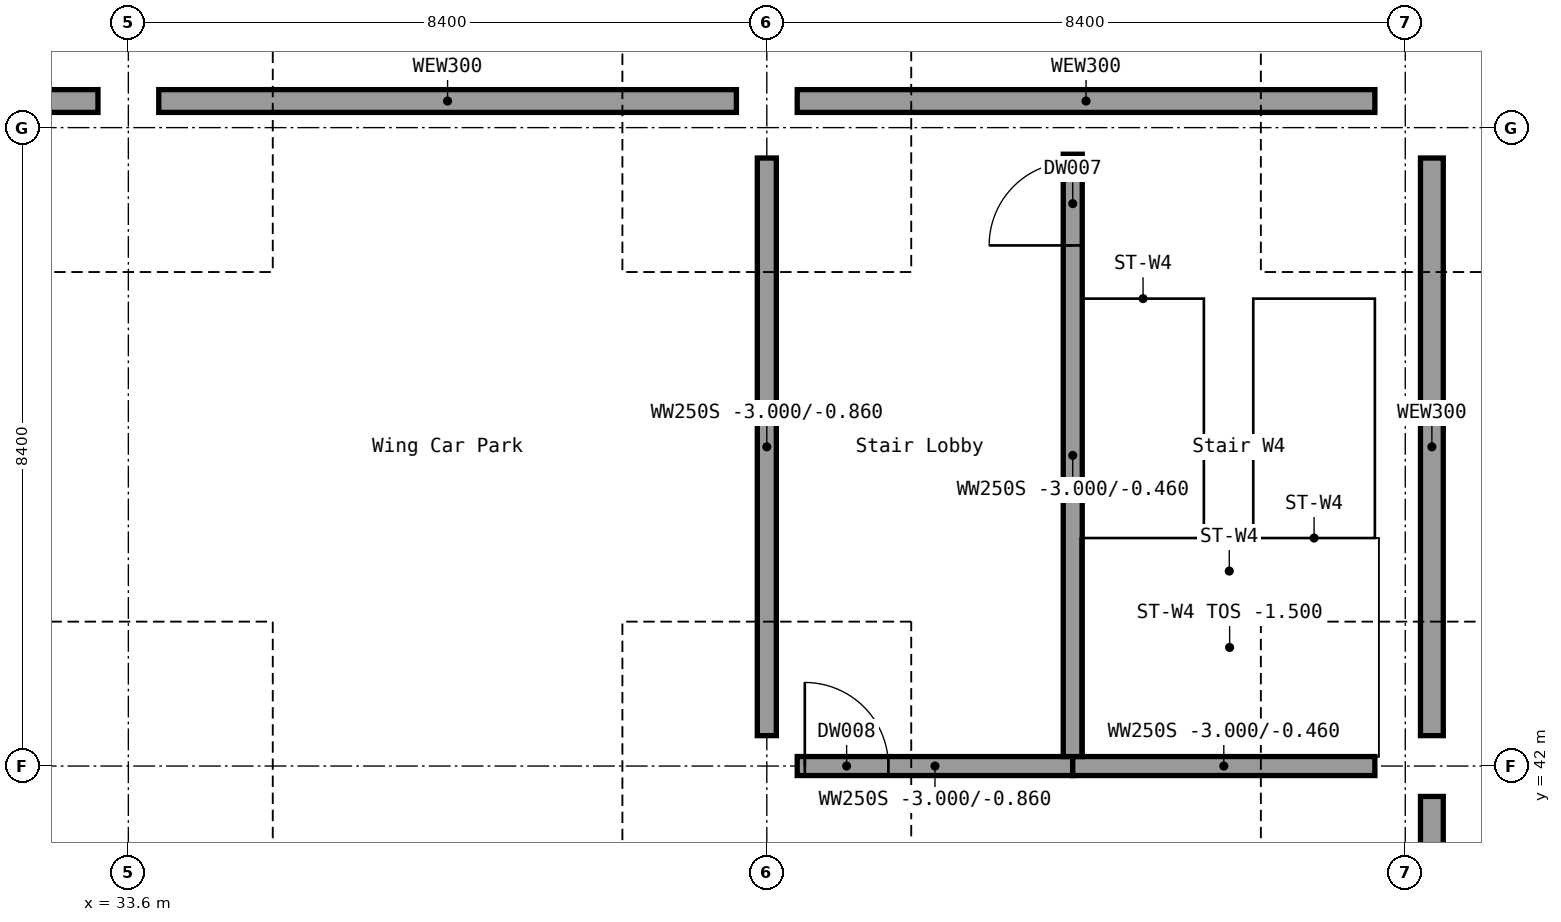
"""IFC4 building model, lengths in metres.
Left out: names, types, materials, properties, quantities, classifications, styles, units other than length and angle.
Written with IfcOpenShell. Run it as: python <this file> out.ifc"""

import sys

from ifc_helpers import new_model, si_unit, direction, frame, frame_2d, origin, origin_2d, place, context, subcontext, project, spatial, rectangle, extrude, element, fill, save


model = new_model("IFC4")
c1 = context("Model", 3, precision=1e-05, world=origin(), true_north=direction((0.0, 1.0)))
c2 = subcontext(c1, "Body", "Model", "MODEL_VIEW")
j1 = project(units=[si_unit("LENGTHUNIT", "METRE"), si_unit("PLANEANGLEUNIT", "RADIAN")], contexts=[c1])
p1 = place(None, origin())
s1 = spatial("IfcSite", under=j1, at=p1, CompositionType="ELEMENT")
p2 = place(p1, origin())
s2 = spatial("IfcBuilding", under=s1, at=p2, CompositionType="ELEMENT")
p3 = place(p2, frame((0.0, 0.0, -3.0)))
s3 = spatial("IfcBuildingStorey", under=s2, at=p3, CompositionType="ELEMENT", Elevation=-3.0)
for number, where, z_axis, x_axis in (
    (1, (33.6, 42.0, 0.0), (0.0, 0.0, 1.0), (1.0, 0.0, 0.0)),
    (2, (33.6, 50.4, 0.0), (0.0, 0.0, 1.0), (1.0, 0.0, 0.0)),
    (3, (42.0, 42.0, 0.0), (0.0, 0.0, 1.0), (1.0, 0.0, 0.0)),
    (4, (42.0, 50.4, 0.0), (0.0, 0.0, 1.0), (1.0, 0.0, 0.0)),
    (5, (50.4, 42.0, 0.0), (0.0, 0.0, 1.0), (1.0, 0.0, 0.0)),
    (6, (50.4, 50.4, 0.0), (0.0, 0.0, 1.0), (1.0, 0.0, 0.0)),
):
    element("IfcColumn", number, at=place(p3, frame(where, z_axis=z_axis, x_axis=x_axis)), inside=s3, PredefinedType="COLUMN", context=c2, shape_type="SweptSolid", body=[
        extrude(rectangle(XDim=0.8, YDim=0.8, at=origin_2d()), origin(), (0.0, 0.0, 1.0), 3.0),
    ])
p4 = place(p3, frame((25.6, 50.75, 0.0), z_axis=(0.0, 0.0, 1.0), x_axis=(1.0, 0.0, 0.0)))
e7 = element("IfcWall", 7, at=p4, inside=s3, PredefinedType="SOLIDWALL", context=c2, shape_type="SweptSolid", body=[
    extrude(rectangle(XDim=7.6, YDim=0.3, at=frame_2d((3.8, 0.0))), origin(), (0.0, 0.0, 1.0), 2.3),
])
for number, where, z_axis, x_axis in (
    (8, (34.0, 50.75, 0.0), (0.0, 0.0, 1.0), (1.0, 0.0, 0.0)),
    (9, (42.4, 50.75, 0.0), (0.0, 0.0, 1.0), (1.0, 0.0, 0.0)),
    (10, (50.75, 34.0, 0.0), (0.0, 0.0, 1.0), (0.0, 1.0, 0.0)),
    (11, (50.75, 42.4, 0.0), (0.0, 0.0, 1.0), (0.0, 1.0, 0.0)),
):
    element("IfcWall", number, at=place(p3, frame(where, z_axis=z_axis, x_axis=x_axis)), inside=s3, PredefinedType="SOLIDWALL", context=c2, shape_type="SweptSolid", body=[
        extrude(rectangle(XDim=7.6, YDim=0.3, at=frame_2d((3.8, 0.0))), origin(), (0.0, 0.0, 1.0), 2.3),
    ])
p5 = place(p3, frame((42.4, 42.0, 0.0), z_axis=(0.0, 0.0, 1.0), x_axis=(1.0, 0.0, 0.0)))
e12 = element("IfcWall", 12, at=p5, inside=s3, PredefinedType="SHEAR", context=c2, shape_type="SweptSolid", body=[
    extrude(rectangle(XDim=3.625, YDim=0.25, at=frame_2d((1.812, 0.0))), origin(), (0.0, 0.0, 1.0), 2.14),
])
p6 = place(p5, frame((0.1, 0.0, 0.0)))
e13 = element("IfcOpeningElement", 13, at=p6, cuts=e12, PredefinedType="OPENING", context=c2, shape_type="SweptSolid", body=[
    extrude(rectangle(XDim=1.1, YDim=2.1, at=frame_2d((0.55, 1.05))), frame((0.0, 0.125, 0.0), z_axis=(0.0, -1.0, 0.0), x_axis=(1.0, 0.0, 0.0)), (0.0, 0.0, 1.0), 0.25),
])
p7 = place(p3, frame((46.025, 42.0, 0.0), z_axis=(0.0, 0.0, 1.0), x_axis=(1.0, 0.0, 0.0)))
e14 = element("IfcWall", 14, at=p7, inside=s3, PredefinedType="SHEAR", context=c2, shape_type="SweptSolid", body=[
    extrude(rectangle(XDim=3.975, YDim=0.25, at=frame_2d((1.988, 0.0))), origin(), (0.0, 0.0, 1.0), 2.54),
])
p8 = place(p3, frame((42.0, 42.4, 0.0), z_axis=(0.0, 0.0, 1.0), x_axis=(0.0, 1.0, 0.0)))
e15 = element("IfcWall", 15, at=p8, inside=s3, PredefinedType="SHEAR", context=c2, shape_type="SweptSolid", body=[
    extrude(rectangle(XDim=7.6, YDim=0.25, at=frame_2d((3.8, 0.0))), origin(), (0.0, 0.0, 1.0), 2.14),
])
p9 = place(p3, frame((46.025, 42.125, 0.0), z_axis=(0.0, 0.0, 1.0), x_axis=(0.0, 1.0, 0.0)))
e16 = element("IfcWall", 16, at=p9, inside=s3, PredefinedType="SHEAR", context=c2, shape_type="SweptSolid", body=[
    extrude(rectangle(XDim=7.925, YDim=0.25, at=frame_2d((3.962, 0.0))), origin(), (0.0, 0.0, 1.0), 2.54),
])
p10 = place(p9, frame((6.725, 0.0, 0.0)))
e17 = element("IfcOpeningElement", 17, at=p10, cuts=e16, PredefinedType="OPENING", context=c2, shape_type="SweptSolid", body=[
    extrude(rectangle(XDim=1.1, YDim=2.1, at=frame_2d((0.55, 1.05))), frame((0.0, 0.125, 0.0), z_axis=(0.0, -1.0, 0.0), x_axis=(1.0, 0.0, 0.0)), (0.0, 0.0, 1.0), 0.25),
])
p11 = place(p10, origin())
e18 = element("IfcDoor", 18, at=p11, inside=s3, OperationType="SINGLE_SWING_RIGHT", PredefinedType="DOOR", context=c2, shape_type="SweptSolid", body=[
    extrude(rectangle(XDim=1.1, YDim=2.1, at=frame_2d((0.55, 1.05))), frame((0.0, 0.025, 0.0), z_axis=(0.0, -1.0, 0.0), x_axis=(1.0, 0.0, 0.0)), (0.0, 0.0, 1.0), 0.05),
])
fill(e17, e18)
p12 = place(p6, origin())
e19 = element("IfcDoor", 19, at=p12, inside=s3, OperationType="SINGLE_SWING_LEFT", PredefinedType="DOOR", context=c2, shape_type="SweptSolid", body=[
    extrude(rectangle(XDim=1.1, YDim=2.1, at=frame_2d((0.55, 1.05))), frame((0.0, 0.025, 0.0), z_axis=(0.0, -1.0, 0.0), x_axis=(1.0, 0.0, 0.0)), (0.0, 0.0, 1.0), 0.05),
])
fill(e13, e19)
save(model, sys.argv[1])
